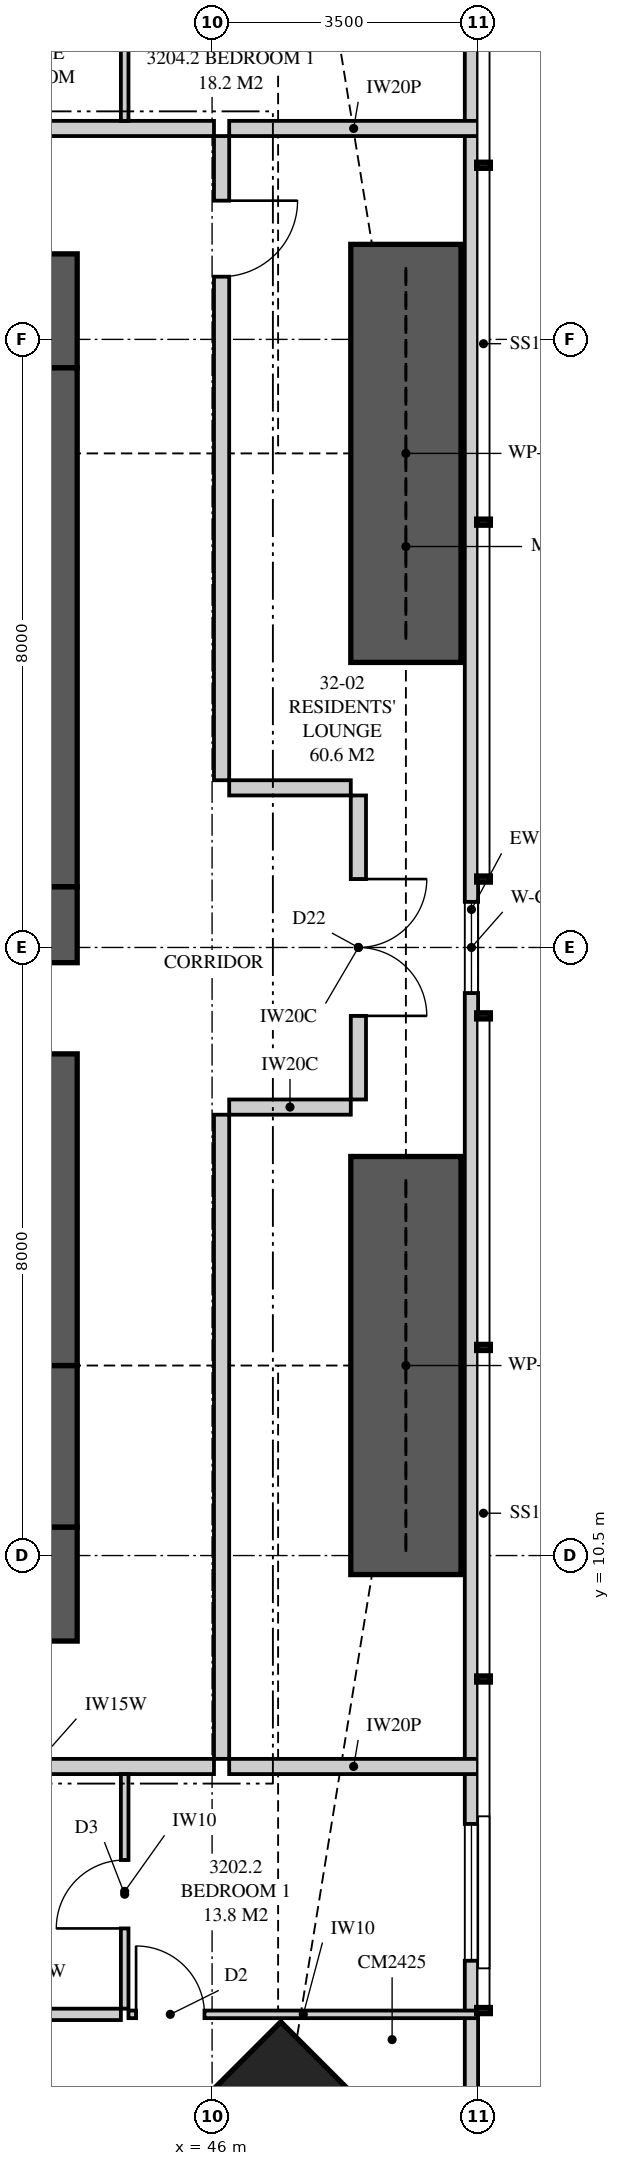
"""IFC4 building model, lengths in metres.
Left out: names, types, materials, properties, quantities, classifications, styles, units other than length and angle.
Written with IfcOpenShell. Run it as: python <this file> out.ifc"""

import sys

from ifc_helpers import new_model, si_unit, direction, frame, frame_2d, origin, origin_2d, place, context, subcontext, project, spatial, polyline, rectangle, outline, extrude, element, fill, save


model = new_model("IFC4")
c1 = context("Model", 3, precision=1e-05, world=origin(), true_north=direction((0.0, 1.0)))
c2 = subcontext(c1, "Body", "Model", "MODEL_VIEW")
j1 = project(units=[si_unit("LENGTHUNIT", "METRE"), si_unit("PLANEANGLEUNIT", "RADIAN")], contexts=[c1])
p1 = place(None, origin())
s1 = spatial("IfcSite", under=j1, at=p1, CompositionType="ELEMENT")
p2 = place(p1, origin())
s2 = spatial("IfcBuilding", under=s1, at=p2, CompositionType="ELEMENT")
p3 = place(p2, frame((0.0, 0.0, 118.25)))
s3 = spatial("IfcBuildingStorey", under=s2, at=p3, CompositionType="ELEMENT", Elevation=118.25)
p4 = place(p3, frame((46.869, 2.631, 0.0), z_axis=(0.0, 0.0, 1.0), x_axis=(-0.707106781187, 0.707106781187, 0.0)))
e1 = element("IfcColumn", 1, at=p4, inside=s3, PredefinedType="COLUMN", context=c2, shape_type="SweptSolid", body=[
    extrude(rectangle(XDim=2.4, YDim=2.5, at=origin_2d()), origin(), (0.0, 0.0, 1.0), 3.35),
])
p5 = place(p3, frame((35.9, 10.125, 0.0), z_axis=(0.0, 0.0, 1.0), x_axis=(1.0, 0.0, 0.0)))
e2 = element("IfcWall", 2, at=p5, inside=s3, PredefinedType="SHEAR", context=c2, shape_type="SweptSolid", body=[
    extrude(rectangle(XDim=8.325, YDim=1.5, at=frame_2d((4.163, 0.0))), origin(), (0.0, 0.0, 1.0), 3.35),
])
p6 = place(p5, frame((2.7, 0.0, 0.0)))
e3 = element("IfcOpeningElement", 3, at=p6, cuts=e2, PredefinedType="OPENING", context=c2, shape_type="SweptSolid", body=[
    extrude(rectangle(XDim=1.0, YDim=2.1, at=frame_2d((0.5, 1.05))), frame((0.0, 0.76, 0.0), z_axis=(0.0, -1.0, 0.0), x_axis=(1.0, 0.0, 0.0)), (0.0, 0.0, 1.0), 1.52),
])
p7 = place(p3, frame((44.225, 26.875, 0.0), z_axis=(0.0, 0.0, 1.0), x_axis=(-1.0, 0.0, 0.0)))
e4 = element("IfcWall", 4, at=p7, inside=s3, PredefinedType="SHEAR", context=c2, shape_type="SweptSolid", body=[
    extrude(rectangle(XDim=8.325, YDim=1.5, at=frame_2d((4.163, 0.0))), origin(), (0.0, 0.0, 1.0), 3.35),
])
p8 = place(p7, frame((5.725, 0.0, 0.0)))
e5 = element("IfcOpeningElement", 5, at=p8, cuts=e4, PredefinedType="OPENING", context=c2, shape_type="SweptSolid", body=[
    extrude(rectangle(XDim=0.9, YDim=2.1, at=frame_2d((0.45, 1.05))), frame((0.0, 0.76, 0.0), z_axis=(0.0, -1.0, 0.0), x_axis=(1.0, 0.0, 0.0)), (0.0, 0.0, 1.0), 1.52),
])
p9 = place(p3, frame((43.8, 10.875, 0.0), z_axis=(0.0, 0.0, 1.0), x_axis=(0.0, 1.0, 0.0)))
e6 = element("IfcWall", 6, at=p9, inside=s3, PredefinedType="SHEAR", context=c2, shape_type="SweptSolid", body=[
    extrude(rectangle(XDim=2.125, YDim=0.85, at=frame_2d((1.062, 0.0))), origin(), (0.0, 0.0, 1.0), 3.35),
])
p10 = place(p3, frame((43.8, 13.0, 0.0), z_axis=(0.0, 0.0, 1.0), x_axis=(0.0, 1.0, 0.0)))
e7 = element("IfcWall", 7, at=p10, inside=s3, PredefinedType="SHEAR", context=c2, shape_type="SweptSolid", body=[
    extrude(rectangle(XDim=6.3, YDim=0.85, at=frame_2d((3.15, 0.0))), origin(), (0.0, 0.0, 1.0), 3.35),
])
p11 = place(p10, frame((4.1, 0.0, 0.0)))
e8 = element("IfcOpeningElement", 8, at=p11, cuts=e7, PredefinedType="OPENING", context=c2, shape_type="SweptSolid", body=[
    extrude(rectangle(XDim=1.2, YDim=2.2, at=frame_2d((0.6, 1.1))), frame((0.0, 0.435, 0.0), z_axis=(0.0, -1.0, 0.0), x_axis=(1.0, 0.0, 0.0)), (0.0, 0.0, 1.0), 0.87),
])
p12 = place(p3, frame((43.8, 19.3, 0.0), z_axis=(0.0, 0.0, 1.0), x_axis=(0.0, 1.0, 0.0)))
e9 = element("IfcWall", 9, at=p12, inside=s3, PredefinedType="SHEAR", context=c2, shape_type="SweptSolid", body=[
    extrude(rectangle(XDim=6.825, YDim=0.85, at=frame_2d((3.413, 0.0))), origin(), (0.0, 0.0, 1.0), 3.35),
])
p13 = place(p3, frame((49.413, 3.051, 0.0), z_axis=(0.0, 0.0, 1.0), x_axis=(0.0, 1.0, 0.0)))
e10 = element("IfcWall", 10, at=p13, inside=s3, PredefinedType="SOLIDWALL", context=c2, shape_type="SweptSolid", body=[
    extrude(outline(polyline([(0.0, 0.0), (31.897, 0.0), (31.897, 3.11), (22.167, 3.11), (22.167, 2.15), (22.074, 2.15), (22.074, 3.11), (21.949, 3.11), (21.949, 2.15), (9.949, 2.15), (9.949, 3.11), (9.823, 3.11), (9.823, 2.15), (9.73, 2.15), (9.73, 3.11), (0.0, 3.11), (0.0, 0.0)])), frame((0.0, 0.087, 0.0), z_axis=(0.0, -1.0, 0.0), x_axis=(1.0, 0.0, 0.0)), (0.0, 0.0, 1.0), 0.175),
])
p14 = place(p13, frame((2.118, 0.0, 0.4)))
e11 = element("IfcOpeningElement", 11, at=p14, cuts=e10, PredefinedType="OPENING", context=c2, shape_type="SweptSolid", body=[
    extrude(rectangle(XDim=1.8, YDim=1.7, at=frame_2d((0.9, 0.85))), frame((0.0, 0.097, 0.0), z_axis=(0.0, -1.0, 0.0), x_axis=(1.0, 0.0, 0.0)), (0.0, 0.0, 1.0), 0.195),
])
p15 = place(p13, frame((14.849, 0.0, 0.4)))
e12 = element("IfcOpeningElement", 12, at=p15, cuts=e10, PredefinedType="OPENING", context=c2, shape_type="SweptSolid", body=[
    extrude(rectangle(XDim=1.2, YDim=1.7, at=frame_2d((0.6, 0.85))), frame((0.0, 0.097, 0.0), z_axis=(0.0, -1.0, 0.0), x_axis=(1.0, 0.0, 0.0)), (0.0, 0.0, 1.0), 0.195),
])
p16 = place(p13, frame((27.479, 0.0, 0.4)))
e13 = element("IfcOpeningElement", 13, at=p16, cuts=e10, PredefinedType="OPENING", context=c2, shape_type="SweptSolid", body=[
    extrude(rectangle(XDim=1.8, YDim=1.7, at=frame_2d((0.9, 0.85))), frame((0.0, 0.097, 0.0), z_axis=(0.0, -1.0, 0.0), x_axis=(1.0, 0.0, 0.0)), (0.0, 0.0, 1.0), 0.195),
])
p17 = place(p3, frame((37.2, 7.725, 0.0), z_axis=(0.0, 0.0, 1.0), x_axis=(1.0, 0.0, 0.0)))
e14 = element("IfcWall", 14, at=p17, inside=s3, PredefinedType="PARTITIONING", context=c2, shape_type="SweptSolid", body=[
    extrude(outline(polyline([(0.0, 0.0), (8.825, 0.0), (8.825, 3.11), (1.762, 3.11), (1.762, 2.541), (1.088, 2.541), (1.088, 3.11), (0.0, 3.11), (0.0, 0.0)])), frame((0.0, 0.1, 0.0), z_axis=(0.0, -1.0, 0.0), x_axis=(1.0, 0.0, 0.0)), (0.0, 0.0, 1.0), 0.2),
])
p18 = place(p17, frame((2.4, 0.0, 0.0)))
e15 = element("IfcOpeningElement", 15, at=p18, cuts=e14, PredefinedType="OPENING", context=c2, shape_type="SweptSolid", body=[
    extrude(rectangle(XDim=1.05, YDim=2.2, at=frame_2d((0.525, 1.1))), frame((0.0, 0.11, 0.0), z_axis=(0.0, -1.0, 0.0), x_axis=(1.0, 0.0, 0.0)), (0.0, 0.0, 1.0), 0.22),
])
p19 = place(p3, frame((44.85, 4.539, 0.0), z_axis=(0.0, 0.0, 1.0), x_axis=(0.0, 1.0, 0.0)))
e16 = element("IfcWall", 16, at=p19, inside=s3, PredefinedType="PARTITIONING", context=c2, shape_type="SweptSolid", body=[
    extrude(rectangle(XDim=3.086, YDim=0.1, at=frame_2d((1.543, 0.0))), origin(), (0.0, 0.0, 1.0), 3.11),
])
p20 = place(p19, frame((1.056, 0.0, 0.0)))
e17 = element("IfcOpeningElement", 17, at=p20, cuts=e16, PredefinedType="OPENING", context=c2, shape_type="SweptSolid", body=[
    extrude(rectangle(XDim=0.9, YDim=2.1, at=frame_2d((0.45, 1.05))), frame((0.0, 0.06, 0.0), z_axis=(0.0, -1.0, 0.0), x_axis=(1.0, 0.0, 0.0)), (0.0, 0.0, 1.0), 0.12),
])
p21 = place(p3, frame((44.9, 4.464, 0.0), z_axis=(0.0, 0.0, 1.0), x_axis=(1.0, 0.0, 0.0)))
e18 = element("IfcWall", 18, at=p21, inside=s3, PredefinedType="PARTITIONING", context=c2, shape_type="SweptSolid", body=[
    extrude(outline(polyline([(0.0, 0.0), (4.6, 0.0), (4.6, 3.11), (3.137, 3.11), (3.137, 2.15), (1.395, 2.15), (1.395, 3.11), (0.0, 3.11), (0.0, 0.0)])), frame((0.0, 0.05, 0.0), z_axis=(0.0, -1.0, 0.0), x_axis=(1.0, 0.0, 0.0)), (0.0, 0.0, 1.0), 0.1),
])
p22 = place(p21, frame((0.1, 0.0, 0.0)))
e19 = element("IfcOpeningElement", 19, at=p22, cuts=e18, PredefinedType="OPENING", context=c2, shape_type="SweptSolid", body=[
    extrude(rectangle(XDim=0.9, YDim=2.1, at=frame_2d((0.45, 1.05))), frame((0.0, 0.06, 0.0), z_axis=(0.0, -1.0, 0.0), x_axis=(1.0, 0.0, 0.0)), (0.0, 0.0, 1.0), 0.12),
])
p23 = place(p3, frame((42.525, 4.464, 0.0), z_axis=(0.0, 0.0, 1.0), x_axis=(1.0, 0.0, 0.0)))
e20 = element("IfcWall", 20, at=p23, inside=s3, PredefinedType="PLUMBINGWALL", context=c2, shape_type="SweptSolid", body=[
    extrude(rectangle(XDim=2.275, YDim=0.15, at=frame_2d((1.138, 0.0))), origin(), (0.0, 0.0, 1.0), 3.11),
])
p24 = place(p3, frame((46.225, 7.725, 0.0), z_axis=(0.0, 0.0, 1.0), x_axis=(1.0, 0.0, 0.0)))
e21 = element("IfcWall", 21, at=p24, inside=s3, PredefinedType="PARTITIONING", context=c2, shape_type="SweptSolid", body=[
    extrude(outline(polyline([(0.0, 0.0), (3.275, 0.0), (3.275, 3.11), (2.392, 3.11), (2.392, 2.15), (0.643, 2.15), (0.643, 2.541), (0.306, 2.541), (0.306, 3.11), (0.0, 3.11), (0.0, 0.0)])), frame((0.0, 0.1, 0.0), z_axis=(0.0, -1.0, 0.0), x_axis=(1.0, 0.0, 0.0)), (0.0, 0.0, 1.0), 0.2),
])
p25 = place(p3, frame((36.9, 29.275, 0.0), z_axis=(0.0, 0.0, 1.0), x_axis=(1.0, 0.0, 0.0)))
e22 = element("IfcWall", 22, at=p25, inside=s3, PredefinedType="PARTITIONING", context=c2, shape_type="SweptSolid", body=[
    extrude(outline(polyline([(0.0, 0.0), (9.125, 0.0), (9.125, 3.11), (2.062, 3.11), (2.062, 2.541), (1.388, 2.541), (1.388, 3.11), (0.0, 3.11), (0.0, 0.0)])), frame((0.0, 0.1, 0.0), z_axis=(0.0, -1.0, 0.0), x_axis=(1.0, 0.0, 0.0)), (0.0, 0.0, 1.0), 0.2),
])
p26 = place(p25, frame((4.3, 0.0, 0.0)))
e23 = element("IfcOpeningElement", 23, at=p26, cuts=e22, PredefinedType="OPENING", context=c2, shape_type="SweptSolid", body=[
    extrude(rectangle(XDim=1.05, YDim=2.2, at=frame_2d((0.525, 1.1))), frame((0.0, 0.11, 0.0), z_axis=(0.0, -1.0, 0.0), x_axis=(1.0, 0.0, 0.0)), (0.0, 0.0, 1.0), 0.22),
])
p27 = place(p3, frame((44.85, 33.461, 0.0), z_axis=(0.0, 0.0, 1.0), x_axis=(0.0, -1.0, 0.0)))
e24 = element("IfcWall", 24, at=p27, inside=s3, PredefinedType="PARTITIONING", context=c2, shape_type="SweptSolid", body=[
    extrude(rectangle(XDim=4.086, YDim=0.1, at=frame_2d((2.043, 0.0))), origin(), (0.0, 0.0, 1.0), 3.11),
])
p28 = place(p27, frame((1.556, 0.0, 0.0)))
e25 = element("IfcOpeningElement", 25, at=p28, cuts=e24, PredefinedType="OPENING", context=c2, shape_type="SweptSolid", body=[
    extrude(rectangle(XDim=0.9, YDim=2.1, at=frame_2d((0.45, 1.05))), frame((0.0, 0.06, 0.0), z_axis=(0.0, -1.0, 0.0), x_axis=(1.0, 0.0, 0.0)), (0.0, 0.0, 1.0), 0.12),
])
p29 = place(p3, frame((46.225, 29.275, 0.0), z_axis=(0.0, 0.0, 1.0), x_axis=(1.0, 0.0, 0.0)))
e26 = element("IfcWall", 26, at=p29, inside=s3, PredefinedType="PARTITIONING", context=c2, shape_type="SweptSolid", body=[
    extrude(outline(polyline([(0.0, 0.0), (3.275, 0.0), (3.275, 3.11), (2.554, 3.11), (2.554, 2.15), (0.805, 2.15), (0.805, 2.541), (0.306, 2.541), (0.306, 3.11), (0.0, 3.11), (0.0, 0.0)])), frame((0.0, 0.1, 0.0), z_axis=(0.0, -1.0, 0.0), x_axis=(1.0, 0.0, 0.0)), (0.0, 0.0, 1.0), 0.2),
])
p30 = place(p3, frame((46.125, 7.825, 0.0), z_axis=(0.0, 0.0, 1.0), x_axis=(0.0, 1.0, 0.0)))
e27 = element("IfcWall", 27, at=p30, inside=s3, PredefinedType="PARTITIONING", context=c2, shape_type="SweptSolid", body=[
    extrude(outline(polyline([(0.0, 0.0), (8.475, 0.0), (8.475, 3.11), (5.512, 3.11), (5.512, 2.541), (4.838, 2.541), (4.838, 3.11), (0.0, 3.11), (0.0, 0.0)])), frame((0.0, 0.1, 0.0), z_axis=(0.0, -1.0, 0.0), x_axis=(1.0, 0.0, 0.0)), (0.0, 0.0, 1.0), 0.2),
])
p31 = place(p3, frame((46.125, 20.7, 0.0), z_axis=(0.0, 0.0, 1.0), x_axis=(0.0, 1.0, 0.0)))
e28 = element("IfcWall", 28, at=p31, inside=s3, PredefinedType="PARTITIONING", context=c2, shape_type="SweptSolid", body=[
    extrude(outline(polyline([(0.0, 0.0), (8.475, 0.0), (8.475, 3.11), (4.637, 3.11), (4.637, 2.541), (3.963, 2.541), (3.963, 3.11), (0.0, 3.11), (0.0, 0.0)])), frame((0.0, 0.1, 0.0), z_axis=(0.0, -1.0, 0.0), x_axis=(1.0, 0.0, 0.0)), (0.0, 0.0, 1.0), 0.2),
])
p32 = place(p31, frame((6.625, 0.0, 0.0)))
e29 = element("IfcOpeningElement", 29, at=p32, cuts=e28, PredefinedType="OPENING", context=c2, shape_type="SweptSolid", body=[
    extrude(rectangle(XDim=1.0, YDim=2.1, at=frame_2d((0.5, 1.05))), frame((0.0, 0.11, 0.0), z_axis=(0.0, -1.0, 0.0), x_axis=(1.0, 0.0, 0.0)), (0.0, 0.0, 1.0), 0.22),
])
p33 = place(p3, frame((47.925, 16.5, 0.0), z_axis=(0.0, 0.0, 1.0), x_axis=(0.0, 1.0, 0.0)))
e30 = element("IfcWall", 30, at=p33, inside=s3, PredefinedType="PARTITIONING", context=c2, shape_type="SweptSolid", body=[
    extrude(outline(polyline([(0.0, 0.0), (4.0, 0.0), (4.0, 3.11), (4.0, 2.15), (0.0, 2.15), (0.0, 3.11), (0.0, 0.0)])), frame((0.0, 0.1, 0.0), z_axis=(0.0, -1.0, 0.0), x_axis=(1.0, 0.0, 0.0)), (0.0, 0.0, 1.0), 0.2),
])
p34 = place(p33, frame((1.1, 0.0, 0.0)))
e31 = element("IfcOpeningElement", 31, at=p34, cuts=e30, PredefinedType="OPENING", context=c2, shape_type="SweptSolid", body=[
    extrude(rectangle(XDim=1.8, YDim=2.1, at=frame_2d((0.9, 1.05))), frame((0.0, 0.11, 0.0), z_axis=(0.0, -1.0, 0.0), x_axis=(1.0, 0.0, 0.0)), (0.0, 0.0, 1.0), 0.22),
])
for number, where, z_axis, x_axis in (
    (32, (46.225, 16.4, 0.0), (0.0, 0.0, 1.0), (1.0, 0.0, 0.0)),
    (33, (46.225, 20.6, 0.0), (0.0, 0.0, 1.0), (1.0, 0.0, 0.0)),
):
    element("IfcWall", number, at=place(p3, frame(where, z_axis=z_axis, x_axis=x_axis)), inside=s3, PredefinedType="PARTITIONING", context=c2, shape_type="SweptSolid", body=[
        extrude(outline(polyline([(0.0, 0.0), (1.6, 0.0), (1.6, 3.11), (1.6, 2.15), (1.415, 2.15), (1.415, 3.11), (0.0, 3.11), (0.0, 0.0)])), frame((0.0, 0.1, 0.0), z_axis=(0.0, -1.0, 0.0), x_axis=(1.0, 0.0, 0.0)), (0.0, 0.0, 1.0), 0.2),
    ])
for number, where, z_axis, x_axis in (
    (34, (48.55, 10.25, 0.0), (0.0, 0.0, 1.0), (0.0, 1.0, 0.0)),
    (35, (48.55, 22.25, 0.0), (0.0, 0.0, 1.0), (0.0, 1.0, 0.0)),
):
    element("IfcWall", number, at=place(p3, frame(where, z_axis=z_axis, x_axis=x_axis)), inside=s3, PredefinedType="SHEAR", context=c2, shape_type="SweptSolid", body=[
        extrude(rectangle(XDim=5.5, YDim=1.45, at=frame_2d((2.75, 0.0))), origin(), (0.0, 0.0, 1.0), 3.35),
    ])
p35 = place(p14, origin())
e36 = element("IfcWindow", 36, at=p35, inside=s3, PartitioningType="SINGLE_PANEL", PredefinedType="WINDOW", context=c2, shape_type="SweptSolid", body=[
    extrude(rectangle(XDim=1.8, YDim=1.7, at=frame_2d((0.9, 0.85))), frame((0.0, 0.03, 0.0), z_axis=(0.0, -1.0, 0.0), x_axis=(1.0, 0.0, 0.0)), (0.0, 0.0, 1.0), 0.06),
])
fill(e11, e36)
p36 = place(p15, origin())
e37 = element("IfcWindow", 37, at=p36, inside=s3, PartitioningType="SINGLE_PANEL", PredefinedType="WINDOW", context=c2, shape_type="SweptSolid", body=[
    extrude(rectangle(XDim=1.2, YDim=1.7, at=frame_2d((0.6, 0.85))), frame((0.0, 0.03, 0.0), z_axis=(0.0, -1.0, 0.0), x_axis=(1.0, 0.0, 0.0)), (0.0, 0.0, 1.0), 0.06),
])
fill(e12, e37)
p37 = place(p22, origin())
e38 = element("IfcDoor", 38, at=p37, inside=s3, OperationType="SINGLE_SWING_LEFT", PredefinedType="DOOR", context=c2, shape_type="SweptSolid", body=[
    extrude(rectangle(XDim=0.9, YDim=2.1, at=frame_2d((0.45, 1.05))), frame((0.0, 0.025, 0.0), z_axis=(0.0, -1.0, 0.0), x_axis=(1.0, 0.0, 0.0)), (0.0, 0.0, 1.0), 0.05),
])
fill(e19, e38)
p38 = place(p20, origin())
e39 = element("IfcDoor", 39, at=p38, inside=s3, OperationType="SINGLE_SWING_LEFT", PredefinedType="DOOR", context=c2, shape_type="SweptSolid", body=[
    extrude(rectangle(XDim=0.9, YDim=2.1, at=frame_2d((0.45, 1.05))), frame((0.0, 0.025, 0.0), z_axis=(0.0, -1.0, 0.0), x_axis=(1.0, 0.0, 0.0)), (0.0, 0.0, 1.0), 0.05),
])
fill(e17, e39)
p39 = place(p34, frame((1.8, 0.0, 0.0), z_axis=(0.0, 0.0, 1.0), x_axis=(-1.0, 0.0, 0.0)))
e40 = element("IfcDoor", 40, at=p39, inside=s3, OperationType="DOUBLE_DOOR_SINGLE_SWING", PredefinedType="DOOR", context=c2, shape_type="SweptSolid", body=[
    extrude(rectangle(XDim=1.8, YDim=2.1, at=frame_2d((0.9, 1.05))), frame((0.0, 0.025, 0.0), z_axis=(0.0, -1.0, 0.0), x_axis=(1.0, 0.0, 0.0)), (0.0, 0.0, 1.0), 0.05),
])
fill(e31, e40)
p40 = place(p32, frame((1.0, 0.0, 0.0), z_axis=(0.0, 0.0, 1.0), x_axis=(-1.0, 0.0, 0.0)))
e41 = element("IfcDoor", 41, at=p40, inside=s3, OperationType="SINGLE_SWING_LEFT", PredefinedType="DOOR", context=c2, shape_type="SweptSolid", body=[
    extrude(rectangle(XDim=1.0, YDim=2.1, at=frame_2d((0.5, 1.05))), frame((0.0, 0.025, 0.0), z_axis=(0.0, -1.0, 0.0), x_axis=(1.0, 0.0, 0.0)), (0.0, 0.0, 1.0), 0.05),
])
fill(e29, e41)
save(model, sys.argv[1])
